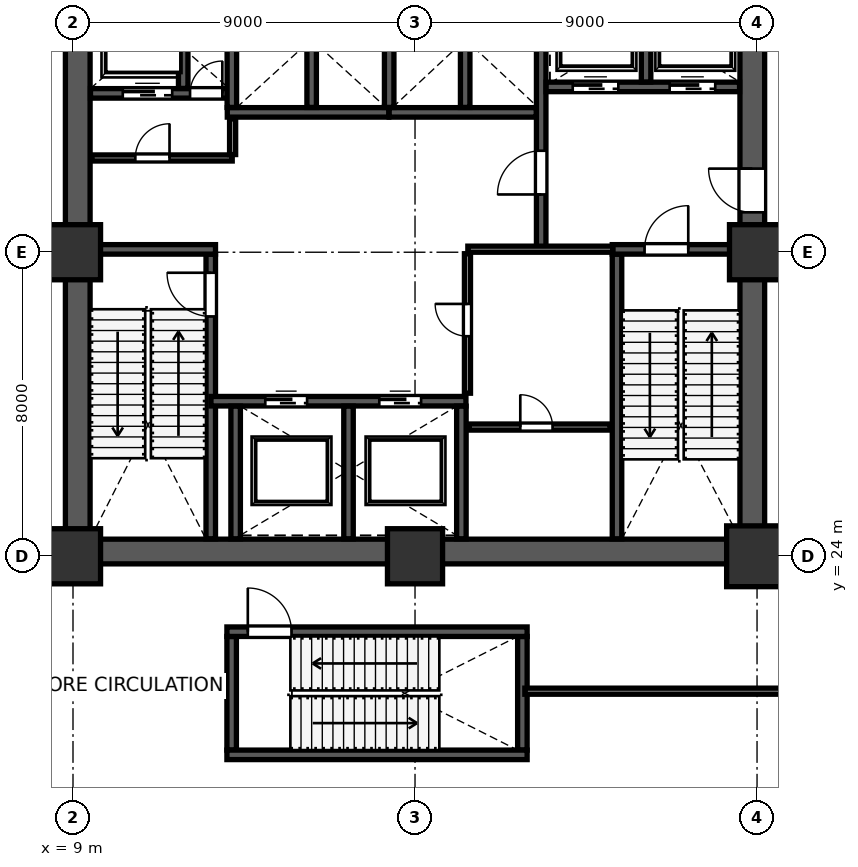
"""IFC4 building model, lengths in metres.
Left out: names, types, materials, properties, quantities, classifications, styles, units other than length and angle.
Written with IfcOpenShell. Run it as: python <this file> out.ifc"""

import sys

from ifc_helpers import new_model, si_unit, direction, frame, frame_2d, origin, origin_2d, place, context, subcontext, project, spatial, rectangle, extrude, source, transform, mapped, element, fill, save


model = new_model("IFC4")
c1 = context("Model", 3, precision=1e-05, world=origin(), true_north=direction((0.0, 1.0)))
c2 = subcontext(c1, "Body", "Model", "MODEL_VIEW")
j1 = project(units=[si_unit("LENGTHUNIT", "METRE"), si_unit("PLANEANGLEUNIT", "RADIAN")], contexts=[c1])
p1 = place(None, origin())
s1 = spatial("IfcSite", under=j1, at=p1, CompositionType="ELEMENT")
p2 = place(p1, origin())
s2 = spatial("IfcBuilding", under=s1, at=p2, CompositionType="ELEMENT")
p3 = place(p2, frame((0.0, 0.0, 12.0)))
s3 = spatial("IfcBuildingStorey", under=s2, at=p3, CompositionType="ELEMENT", Elevation=12.0)
m1 = source(origin(), c2, "Body", "SweptSolid", [
    extrude(rectangle(XDim=1.45, YDim=1.45, at=origin_2d()), origin(), (0.0, 0.0, 1.0), 5.398),
])
p4 = place(p3, frame((9.0, 24.0, 0.001), z_axis=(0.0, 0.0, 1.0), x_axis=(1.0, 0.0, 0.0)))
e1 = element("IfcColumn", 1, at=p4, inside=s3, PredefinedType="COLUMN", context=c2, shape_type="MappedRepresentation", body=[
    mapped(m1, transform((0.0, 0.0, 0.0), scale=1.0)),
])
m2 = source(origin(), c2, "Body", "SweptSolid", [
    extrude(rectangle(XDim=1.45, YDim=1.45, at=origin_2d()), origin(), (0.0, 0.0, 1.0), 5.398),
])
p5 = place(p3, frame((9.0, 32.0, 0.001), z_axis=(0.0, 0.0, 1.0), x_axis=(1.0, 0.0, 0.0)))
e2 = element("IfcColumn", 2, at=p5, inside=s3, PredefinedType="COLUMN", context=c2, shape_type="MappedRepresentation", body=[
    mapped(m2, transform((0.0, 0.0, 0.0), scale=1.0)),
])
p6 = place(p3, frame((18.0, 24.0, 0.001), z_axis=(0.0, 0.0, 1.0), x_axis=(1.0, 0.0, 0.0)))
e3 = element("IfcColumn", 3, at=p6, inside=s3, PredefinedType="COLUMN", context=c2, shape_type="MappedRepresentation", body=[
    mapped(m1, transform((0.0, 0.0, 0.0), scale=1.0)),
])
m3 = source(origin(), c2, "Body", "SweptSolid", [
    extrude(rectangle(XDim=1.6, YDim=1.6, at=origin_2d()), origin(), (0.0, 0.0, 1.0), 5.398),
])
p7 = place(p3, frame((27.0, 24.0, 0.001), z_axis=(0.0, 0.0, 1.0), x_axis=(1.0, 0.0, 0.0)))
e4 = element("IfcColumn", 4, at=p7, inside=s3, PredefinedType="COLUMN", context=c2, shape_type="MappedRepresentation", body=[
    mapped(m3, transform((0.0, 0.0, 0.0), scale=1.0)),
])
p8 = place(p3, frame((27.0, 32.0, 0.001), z_axis=(0.0, 0.0, 1.0), x_axis=(1.0, 0.0, 0.0)))
e5 = element("IfcColumn", 5, at=p8, inside=s3, PredefinedType="COLUMN", context=c2, shape_type="MappedRepresentation", body=[
    mapped(m2, transform((0.0, 0.0, 0.0), scale=1.0)),
])
p9 = place(p3, frame((9.125, 24.45, 0.0), z_axis=(0.0, 0.0, 1.0), x_axis=(0.0, 1.0, 0.0)))
e6 = element("IfcWall", 6, at=p9, inside=s3, PredefinedType="SHEAR", context=c2, shape_type="SweptSolid", body=[
    extrude(rectangle(XDim=15.1, YDim=0.65, at=frame_2d((7.55, 0.0))), origin(), (0.0, 0.0, 1.0), 5.14),
])
p10 = place(p3, frame((26.875, 24.45, 0.0), z_axis=(0.0, 0.0, 1.0), x_axis=(0.0, 1.0, 0.0)))
e7 = element("IfcWall", 7, at=p10, inside=s3, PredefinedType="SHEAR", context=c2, shape_type="SweptSolid", body=[
    extrude(rectangle(XDim=15.1, YDim=0.65, at=frame_2d((7.55, 0.0))), origin(), (0.0, 0.0, 1.0), 5.14),
])
p11 = place(p10, frame((8.6, 0.0, 0.0)))
e8 = element("IfcOpeningElement", 8, at=p11, cuts=e7, PredefinedType="OPENING", context=c2, shape_type="SweptSolid", body=[
    extrude(rectangle(XDim=1.15, YDim=2.2, at=frame_2d((0.575, 1.1))), frame((0.0, 0.335, 0.0), z_axis=(0.0, -1.0, 0.0), x_axis=(1.0, 0.0, 0.0)), (0.0, 0.0, 1.0), 0.67),
])
p12 = place(p3, frame((8.8, 24.125, 0.0), z_axis=(0.0, 0.0, 1.0), x_axis=(1.0, 0.0, 0.0)))
e9 = element("IfcWall", 9, at=p12, inside=s3, PredefinedType="SHEAR", context=c2, shape_type="SweptSolid", body=[
    extrude(rectangle(XDim=18.4, YDim=0.65, at=frame_2d((9.2, 0.0))), origin(), (0.0, 0.0, 1.0), 5.14),
])
p13 = place(p3, frame((12.625, 24.46, 0.0), z_axis=(0.0, 0.0, 1.0), x_axis=(0.0, 1.0, 0.0)))
e10 = element("IfcWall", 10, at=p13, inside=s3, PredefinedType="SHEAR", context=c2, shape_type="SweptSolid", body=[
    extrude(rectangle(XDim=7.49, YDim=0.25, at=frame_2d((3.745, 0.0))), origin(), (0.0, 0.0, 1.0), 5.14),
])
p14 = place(p13, frame((5.85, 0.0, 0.0)))
e11 = element("IfcOpeningElement", 11, at=p14, cuts=e10, PredefinedType="OPENING", context=c2, shape_type="SweptSolid", body=[
    extrude(rectangle(XDim=1.15, YDim=2.2, at=frame_2d((0.575, 1.1))), frame((0.0, 0.135, 0.0), z_axis=(0.0, -1.0, 0.0), x_axis=(1.0, 0.0, 0.0)), (0.0, 0.0, 1.0), 0.27),
])
p15 = place(p3, frame((9.46, 32.075, 0.0), z_axis=(0.0, 0.0, 1.0), x_axis=(1.0, 0.0, 0.0)))
e12 = element("IfcWall", 12, at=p15, inside=s3, PredefinedType="SHEAR", context=c2, shape_type="SweptSolid", body=[
    extrude(rectangle(XDim=3.29, YDim=0.25, at=frame_2d((1.645, 0.0))), origin(), (0.0, 0.0, 1.0), 5.14),
])
p16 = place(p3, frame((23.315, 24.46, 0.0), z_axis=(0.0, 0.0, 1.0), x_axis=(0.0, 1.0, 0.0)))
e13 = element("IfcWall", 13, at=p16, inside=s3, PredefinedType="SHEAR", context=c2, shape_type="SweptSolid", body=[
    extrude(rectangle(XDim=7.49, YDim=0.25, at=frame_2d((3.745, 0.0))), origin(), (0.0, 0.0, 1.0), 5.14),
])
p17 = place(p3, frame((23.19, 32.075, 0.0), z_axis=(0.0, 0.0, 1.0), x_axis=(1.0, 0.0, 0.0)))
e14 = element("IfcWall", 14, at=p17, inside=s3, PredefinedType="SHEAR", context=c2, shape_type="SweptSolid", body=[
    extrude(rectangle(XDim=3.35, YDim=0.25, at=frame_2d((1.675, 0.0))), origin(), (0.0, 0.0, 1.0), 5.14),
])
p18 = place(p17, frame((0.85, 0.0, 0.0)))
e15 = element("IfcOpeningElement", 15, at=p18, cuts=e14, PredefinedType="OPENING", context=c2, shape_type="SweptSolid", body=[
    extrude(rectangle(XDim=1.15, YDim=2.2, at=frame_2d((0.575, 1.1))), frame((0.0, 0.135, 0.0), z_axis=(0.0, -1.0, 0.0), x_axis=(1.0, 0.0, 0.0)), (0.0, 0.0, 1.0), 0.27),
])
p19 = place(p3, frame((21.32, 32.12, 0.0), z_axis=(0.0, 0.0, 1.0), x_axis=(0.0, 1.0, 0.0)))
e16 = element("IfcWall", 16, at=p19, inside=s3, PredefinedType="SHEAR", context=c2, shape_type="SweptSolid", body=[
    extrude(rectangle(XDim=7.42, YDim=0.25, at=frame_2d((3.71, 0.0))), origin(), (0.0, 0.0, 1.0), 5.14),
])
p20 = place(p19, frame((1.4, 0.0, 0.0)))
e17 = element("IfcOpeningElement", 17, at=p20, cuts=e16, PredefinedType="OPENING", context=c2, shape_type="SweptSolid", body=[
    extrude(rectangle(XDim=1.15, YDim=2.2, at=frame_2d((0.575, 1.1))), frame((0.0, 0.135, 0.0), z_axis=(0.0, -1.0, 0.0), x_axis=(1.0, 0.0, 0.0)), (0.0, 0.0, 1.0), 0.27),
])
p21 = place(p3, frame((9.46, 36.18, 0.0), z_axis=(0.0, 0.0, 1.0), x_axis=(1.0, 0.0, 0.0)))
e18 = element("IfcWall", 18, at=p21, inside=s3, PredefinedType="SHEAR", context=c2, shape_type="SweptSolid", body=[
    extrude(rectangle(XDim=3.79, YDim=0.25, at=frame_2d((1.895, 0.0))), origin(), (0.0, 0.0, 1.0), 5.14),
])
p22 = place(p21, frame((2.62, 0.0, 0.0)))
e19 = element("IfcOpeningElement", 19, at=p22, cuts=e18, PredefinedType="OPENING", context=c2, shape_type="SweptSolid", body=[
    extrude(rectangle(XDim=0.85, YDim=2.1, at=frame_2d((0.425, 1.05))), frame((0.0, 0.135, 0.0), z_axis=(0.0, -1.0, 0.0), x_axis=(1.0, 0.0, 0.0)), (0.0, 0.0, 1.0), 0.27),
])
p23 = place(p21, frame((0.85, 0.0, 0.0)))
e20 = element("IfcOpeningElement", 20, at=p23, cuts=e18, PredefinedType="OPENING", context=c2, shape_type="SweptSolid", body=[
    extrude(rectangle(XDim=1.3, YDim=2.25, at=frame_2d((0.65, 1.125))), frame((0.0, 0.135, 0.0), z_axis=(0.0, -1.0, 0.0), x_axis=(1.0, 0.0, 0.0)), (0.0, 0.0, 1.0), 0.27),
])
p24 = place(p3, frame((11.9, 36.31, 0.0), z_axis=(0.0, 0.0, 1.0), x_axis=(0.0, 1.0, 0.0)))
e21 = element("IfcWall", 21, at=p24, inside=s3, PredefinedType="SHEAR", context=c2, shape_type="SweptSolid", body=[
    extrude(rectangle(XDim=3.23, YDim=0.25, at=frame_2d((1.615, 0.0))), origin(), (0.0, 0.0, 1.0), 5.14),
])
p25 = place(p3, frame((21.45, 36.35, 0.0), z_axis=(0.0, 0.0, 1.0), x_axis=(1.0, 0.0, 0.0)))
e22 = element("IfcWall", 22, at=p25, inside=s3, PredefinedType="SHEAR", context=c2, shape_type="SweptSolid", body=[
    extrude(rectangle(XDim=5.09, YDim=0.25, at=frame_2d((2.545, 0.0))), origin(), (0.0, 0.0, 1.0), 5.14),
])
p26 = place(p25, frame((0.7, 0.0, 0.0)))
e23 = element("IfcOpeningElement", 23, at=p26, cuts=e22, PredefinedType="OPENING", context=c2, shape_type="SweptSolid", body=[
    extrude(rectangle(XDim=1.2, YDim=2.2, at=frame_2d((0.6, 1.1))), frame((0.0, 0.135, 0.0), z_axis=(0.0, -1.0, 0.0), x_axis=(1.0, 0.0, 0.0)), (0.0, 0.0, 1.0), 0.27),
])
p27 = place(p25, frame((3.25, 0.0, 0.0)))
e24 = element("IfcOpeningElement", 24, at=p27, cuts=e22, PredefinedType="OPENING", context=c2, shape_type="SweptSolid", body=[
    extrude(rectangle(XDim=1.2, YDim=2.2, at=frame_2d((0.6, 1.1))), frame((0.0, 0.135, 0.0), z_axis=(0.0, -1.0, 0.0), x_axis=(1.0, 0.0, 0.0)), (0.0, 0.0, 1.0), 0.27),
])
p28 = place(p3, frame((24.08, 36.48, 0.0), z_axis=(0.0, 0.0, 1.0), x_axis=(0.0, 1.0, 0.0)))
e25 = element("IfcWall", 25, at=p28, inside=s3, PredefinedType="SHEAR", context=c2, shape_type="SweptSolid", body=[
    extrude(rectangle(XDim=3.06, YDim=0.25, at=frame_2d((1.53, 0.0))), origin(), (0.0, 0.0, 1.0), 5.14),
])
p29 = place(p3, frame((12.63, 28.08, 0.0), z_axis=(0.0, 0.0, 1.0), x_axis=(1.0, 0.0, 0.0)))
e26 = element("IfcWall", 26, at=p29, inside=s3, PredefinedType="SHEAR", context=c2, shape_type="SweptSolid", body=[
    extrude(rectangle(XDim=6.71, YDim=0.25, at=frame_2d((3.355, 0.0))), origin(), (0.0, 0.0, 1.0), 5.14),
])
p30 = place(p29, frame((1.43, 0.0, 0.0)))
e27 = element("IfcOpeningElement", 27, at=p30, cuts=e26, PredefinedType="OPENING", context=c2, shape_type="SweptSolid", body=[
    extrude(rectangle(XDim=1.1, YDim=2.2, at=frame_2d((0.55, 1.1))), frame((0.0, 0.135, 0.0), z_axis=(0.0, -1.0, 0.0), x_axis=(1.0, 0.0, 0.0)), (0.0, 0.0, 1.0), 0.27),
])
p31 = place(p29, frame((4.43, 0.0, 0.0)))
e28 = element("IfcOpeningElement", 28, at=p31, cuts=e26, PredefinedType="OPENING", context=c2, shape_type="SweptSolid", body=[
    extrude(rectangle(XDim=1.1, YDim=2.2, at=frame_2d((0.55, 1.1))), frame((0.0, 0.135, 0.0), z_axis=(0.0, -1.0, 0.0), x_axis=(1.0, 0.0, 0.0)), (0.0, 0.0, 1.0), 0.27),
])
for number, where, z_axis, x_axis in (
    (29, (13.28, 24.46, 0.0), (0.0, 0.0, 1.0), (0.0, 1.0, 0.0)),
    (30, (16.25, 24.46, 0.0), (0.0, 0.0, 1.0), (0.0, 1.0, 0.0)),
    (31, (19.22, 24.46, 0.0), (0.0, 0.0, 1.0), (0.0, 1.0, 0.0)),
):
    element("IfcWall", number, at=place(p3, frame(where, z_axis=z_axis, x_axis=x_axis)), inside=s3, PredefinedType="SHEAR", context=c2, shape_type="SweptSolid", body=[
        extrude(rectangle(XDim=3.49, YDim=0.25, at=frame_2d((1.745, 0.0))), origin(), (0.0, 0.0, 1.0), 5.14),
    ])
p32 = place(p3, frame((13.06, 35.68, 0.0), z_axis=(0.0, 0.0, 1.0), x_axis=(1.0, 0.0, 0.0)))
e32 = element("IfcWall", 32, at=p32, inside=s3, PredefinedType="SHEAR", context=c2, shape_type="SweptSolid", body=[
    extrude(rectangle(XDim=4.25, YDim=0.25, at=frame_2d((2.125, 0.0))), origin(), (0.0, 0.0, 1.0), 5.14),
])
for number, where, z_axis, x_axis in (
    (33, (13.18, 35.81, 0.0), (0.0, 0.0, 1.0), (0.0, 1.0, 0.0)),
    (34, (15.28, 35.81, 0.0), (0.0, 0.0, 1.0), (0.0, 1.0, 0.0)),
):
    element("IfcWall", number, at=place(p3, frame(where, z_axis=z_axis, x_axis=x_axis)), inside=s3, PredefinedType="SHEAR", context=c2, shape_type="SweptSolid", body=[
        extrude(rectangle(XDim=3.73, YDim=0.25, at=frame_2d((1.865, 0.0))), origin(), (0.0, 0.0, 1.0), 5.14),
    ])
p33 = place(p3, frame((17.32, 35.68, 0.0), z_axis=(0.0, 0.0, 1.0), x_axis=(1.0, 0.0, 0.0)))
e35 = element("IfcWall", 35, at=p33, inside=s3, PredefinedType="SHEAR", context=c2, shape_type="SweptSolid", body=[
    extrude(rectangle(XDim=3.87, YDim=0.25, at=frame_2d((1.935, 0.0))), origin(), (0.0, 0.0, 1.0), 5.14),
])
for number, where, z_axis, x_axis in (
    (36, (17.32, 35.81, 0.0), (0.0, 0.0, 1.0), (0.0, 1.0, 0.0)),
    (37, (19.32, 35.81, 0.0), (0.0, 0.0, 1.0), (0.0, 1.0, 0.0)),
):
    element("IfcWall", number, at=place(p3, frame(where, z_axis=z_axis, x_axis=x_axis)), inside=s3, PredefinedType="SHEAR", context=c2, shape_type="SweptSolid", body=[
        extrude(rectangle(XDim=3.73, YDim=0.25, at=frame_2d((1.865, 0.0))), origin(), (0.0, 0.0, 1.0), 5.14),
    ])
for number, where, z_axis, x_axis in (
    (38, (13.175, 18.9, 0.0), (0.0, 0.0, 1.0), (0.0, 1.0, 0.0)),
    (39, (20.825, 18.9, 0.0), (0.0, 0.0, 1.0), (0.0, 1.0, 0.0)),
):
    element("IfcWall", number, at=place(p3, frame(where, z_axis=z_axis, x_axis=x_axis)), inside=s3, PredefinedType="SHEAR", context=c2, shape_type="SweptSolid", body=[
        extrude(rectangle(XDim=2.99, YDim=0.25, at=frame_2d((1.495, 0.0))), origin(), (0.0, 0.0, 1.0), 5.14),
    ])
p34 = place(p3, frame((13.05, 18.775, 0.0), z_axis=(0.0, 0.0, 1.0), x_axis=(1.0, 0.0, 0.0)))
e40 = element("IfcWall", 40, at=p34, inside=s3, PredefinedType="SHEAR", context=c2, shape_type="SweptSolid", body=[
    extrude(rectangle(XDim=7.9, YDim=0.25, at=frame_2d((3.95, 0.0))), origin(), (0.0, 0.0, 1.0), 5.14),
])
p35 = place(p3, frame((13.05, 22.015, 0.0), z_axis=(0.0, 0.0, 1.0), x_axis=(1.0, 0.0, 0.0)))
e41 = element("IfcWall", 41, at=p35, inside=s3, PredefinedType="SHEAR", context=c2, shape_type="SweptSolid", body=[
    extrude(rectangle(XDim=7.9, YDim=0.25, at=frame_2d((3.95, 0.0))), origin(), (0.0, 0.0, 1.0), 5.14),
])
p36 = place(p35, frame((0.55, 0.0, 0.0)))
e42 = element("IfcOpeningElement", 42, at=p36, cuts=e41, PredefinedType="OPENING", context=c2, shape_type="SweptSolid", body=[
    extrude(rectangle(XDim=1.15, YDim=2.2, at=frame_2d((0.575, 1.1))), frame((0.0, 0.135, 0.0), z_axis=(0.0, -1.0, 0.0), x_axis=(1.0, 0.0, 0.0)), (0.0, 0.0, 1.0), 0.27),
])
p37 = place(p3, frame((9.49, 34.48, 0.0), z_axis=(0.0, 0.0, 1.0), x_axis=(1.0, 0.0, 0.0)))
e43 = element("IfcWall", 43, at=p37, inside=s3, PredefinedType="PARTITIONING", context=c2, shape_type="SweptSolid", body=[
    extrude(rectangle(XDim=3.7, YDim=0.16, at=frame_2d((1.85, 0.0))), origin(), (0.0, 0.0, 1.0), 5.14),
])
p38 = place(p37, frame((1.15, 0.0, 0.0)))
e44 = element("IfcOpeningElement", 44, at=p38, cuts=e43, PredefinedType="OPENING", context=c2, shape_type="SweptSolid", body=[
    extrude(rectangle(XDim=0.9, YDim=2.15, at=frame_2d((0.45, 1.075))), frame((0.0, 0.09, 0.0), z_axis=(0.0, -1.0, 0.0), x_axis=(1.0, 0.0, 0.0)), (0.0, 0.0, 1.0), 0.18),
])
p39 = place(p3, frame((13.2, 34.57, 0.0), z_axis=(0.0, 0.0, 1.0), x_axis=(0.0, 1.0, 0.0)))
e45 = element("IfcWall", 45, at=p39, inside=s3, PredefinedType="PARTITIONING", context=c2, shape_type="SweptSolid", body=[
    extrude(rectangle(XDim=0.94, YDim=0.16, at=frame_2d((0.47, 0.0))), origin(), (0.0, 0.0, 1.0), 5.14),
])
p40 = place(p3, frame((19.39, 32.08, 0.0), z_axis=(0.0, 0.0, 1.0), x_axis=(1.0, 0.0, 0.0)))
e46 = element("IfcWall", 46, at=p40, inside=s3, PredefinedType="PARTITIONING", context=c2, shape_type="SweptSolid", body=[
    extrude(rectangle(XDim=3.82, YDim=0.16, at=frame_2d((1.91, 0.0))), origin(), (0.0, 0.0, 1.0), 5.14),
])
p41 = place(p3, frame((19.38, 28.29, 0.0), z_axis=(0.0, 0.0, 1.0), x_axis=(0.0, 1.0, 0.0)))
e47 = element("IfcWall", 47, at=p41, inside=s3, PredefinedType="PARTITIONING", context=c2, shape_type="SweptSolid", body=[
    extrude(rectangle(XDim=3.67, YDim=0.16, at=frame_2d((1.835, 0.0))), origin(), (0.0, 0.0, 1.0), 5.14),
])
p42 = place(p41, frame((1.5, 0.0, 0.0)))
e48 = element("IfcOpeningElement", 48, at=p42, cuts=e47, PredefinedType="OPENING", context=c2, shape_type="SweptSolid", body=[
    extrude(rectangle(XDim=0.85, YDim=2.1, at=frame_2d((0.425, 1.05))), frame((0.0, 0.09, 0.0), z_axis=(0.0, -1.0, 0.0), x_axis=(1.0, 0.0, 0.0)), (0.0, 0.0, 1.0), 0.18),
])
p43 = place(p3, frame((19.42, 27.4, 0.0), z_axis=(0.0, 0.0, 1.0), x_axis=(1.0, 0.0, 0.0)))
e49 = element("IfcWall", 49, at=p43, inside=s3, PredefinedType="PARTITIONING", context=c2, shape_type="SweptSolid", body=[
    extrude(rectangle(XDim=3.72, YDim=0.16, at=frame_2d((1.86, 0.0))), origin(), (0.0, 0.0, 1.0), 5.14),
])
p44 = place(p43, frame((1.35, 0.0, 0.0)))
e50 = element("IfcOpeningElement", 50, at=p44, cuts=e49, PredefinedType="OPENING", context=c2, shape_type="SweptSolid", body=[
    extrude(rectangle(XDim=0.85, YDim=2.1, at=frame_2d((0.425, 1.05))), frame((0.0, 0.09, 0.0), z_axis=(0.0, -1.0, 0.0), x_axis=(1.0, 0.0, 0.0)), (0.0, 0.0, 1.0), 0.18),
])
p45 = place(p3, frame((20.89, 20.45, 0.0), z_axis=(0.0, 0.0, 1.0), x_axis=(1.0, 0.0, 0.0)))
e51 = element("IfcWall", 51, at=p45, inside=s3, PredefinedType="PARTITIONING", context=c2, shape_type="SweptSolid", body=[
    extrude(rectangle(XDim=27.07, YDim=0.16, at=frame_2d((13.535, 0.0))), origin(), (0.0, 0.0, 1.0), 4.27),
])
p46 = place(p45, frame((10.6, 0.0, 0.0)))
e52 = element("IfcOpeningElement", 52, at=p46, cuts=e51, PredefinedType="OPENING", context=c2, shape_type="SweptSolid", body=[
    extrude(rectangle(XDim=1.1, YDim=2.2, at=frame_2d((0.55, 1.1))), frame((0.0, 0.09, 0.0), z_axis=(0.0, -1.0, 0.0), x_axis=(1.0, 0.0, 0.0)), (0.0, 0.0, 1.0), 0.18),
])
m4 = source(origin(), c2, "Body", "SweptSolid", [
    extrude(rectangle(XDim=1.15, YDim=2.2, at=frame_2d((0.575, 1.1))), frame((0.0, 0.025, 0.0), z_axis=(0.0, -1.0, 0.0), x_axis=(1.0, 0.0, 0.0)), (0.0, 0.0, 1.0), 0.05),
])
p47 = place(p14, origin())
e53 = element("IfcDoor", 53, at=p47, inside=s3, OperationType="SINGLE_SWING_RIGHT", PredefinedType="DOOR", context=c2, shape_type="MappedRepresentation", body=[
    mapped(m4, transform((0.0, 0.0, 0.0), scale=1.0)),
])
fill(e11, e53)
m5 = source(origin(), c2, "Body", "SweptSolid", [
    extrude(rectangle(XDim=1.15, YDim=2.2, at=frame_2d((0.575, 1.1))), frame((0.0, 0.025, 0.0), z_axis=(0.0, -1.0, 0.0), x_axis=(1.0, 0.0, 0.0)), (0.0, 0.0, 1.0), 0.05),
])
p48 = place(p20, origin())
e54 = element("IfcDoor", 54, at=p48, inside=s3, OperationType="SINGLE_SWING_LEFT", PredefinedType="DOOR", context=c2, shape_type="MappedRepresentation", body=[
    mapped(m5, transform((0.0, 0.0, 0.0), scale=1.0)),
])
fill(e17, e54)
p49 = place(p18, origin())
e55 = element("IfcDoor", 55, at=p49, inside=s3, OperationType="SINGLE_SWING_RIGHT", PredefinedType="DOOR", context=c2, shape_type="MappedRepresentation", body=[
    mapped(m4, transform((0.0, 0.0, 0.0), scale=1.0)),
])
fill(e15, e55)
p50 = place(p11, origin())
e56 = element("IfcDoor", 56, at=p50, inside=s3, OperationType="SINGLE_SWING_RIGHT", PredefinedType="DOOR", context=c2, shape_type="MappedRepresentation", body=[
    mapped(m5, transform((0.0, 0.0, 0.0), scale=1.0)),
])
fill(e8, e56)
p51 = place(p36, origin())
e57 = element("IfcDoor", 57, at=p51, inside=s3, OperationType="SINGLE_SWING_LEFT", PredefinedType="DOOR", context=c2, shape_type="MappedRepresentation", body=[
    mapped(m4, transform((0.0, 0.0, 0.0), scale=1.0)),
])
fill(e42, e57)
m6 = source(origin(), c2, "Body", "SweptSolid", [
    extrude(rectangle(XDim=0.85, YDim=2.1, at=frame_2d((0.425, 1.05))), frame((0.0, 0.025, 0.0), z_axis=(0.0, -1.0, 0.0), x_axis=(1.0, 0.0, 0.0)), (0.0, 0.0, 1.0), 0.05),
])
p52 = place(p22, origin())
e58 = element("IfcDoor", 58, at=p52, inside=s3, OperationType="SINGLE_SWING_RIGHT", PredefinedType="DOOR", context=c2, shape_type="MappedRepresentation", body=[
    mapped(m6, transform((0.0, 0.0, 0.0), scale=1.0)),
])
fill(e19, e58)
m7 = source(origin(), c2, "Body", "SweptSolid", [
    extrude(rectangle(XDim=1.1, YDim=2.2, at=frame_2d((0.55, 1.1))), frame((0.0, 0.025, 0.0), z_axis=(0.0, -1.0, 0.0), x_axis=(1.0, 0.0, 0.0)), (0.0, 0.0, 1.0), 0.05),
])
p53 = place(p30, origin())
e59 = element("IfcDoor", 59, at=p53, inside=s3, OperationType="SLIDING_TO_LEFT", PredefinedType="DOOR", context=c2, shape_type="MappedRepresentation", body=[
    mapped(m7, transform((0.0, 0.0, 0.0), scale=1.0)),
])
fill(e27, e59)
p54 = place(p31, origin())
e60 = element("IfcDoor", 60, at=p54, inside=s3, OperationType="SLIDING_TO_RIGHT", PredefinedType="DOOR", context=c2, shape_type="MappedRepresentation", body=[
    mapped(m7, transform((0.0, 0.0, 0.0), scale=1.0)),
])
fill(e28, e60)
m8 = source(origin(), c2, "Body", "SweptSolid", [
    extrude(rectangle(XDim=1.2, YDim=2.2, at=frame_2d((0.6, 1.1))), frame((0.0, 0.025, 0.0), z_axis=(0.0, -1.0, 0.0), x_axis=(1.0, 0.0, 0.0)), (0.0, 0.0, 1.0), 0.05),
])
p55 = place(p26, origin())
e61 = element("IfcDoor", 61, at=p55, inside=s3, OperationType="SLIDING_TO_LEFT", PredefinedType="DOOR", context=c2, shape_type="MappedRepresentation", body=[
    mapped(m8, transform((0.0, 0.0, 0.0), scale=1.0)),
])
fill(e23, e61)
p56 = place(p27, origin())
e62 = element("IfcDoor", 62, at=p56, inside=s3, OperationType="SLIDING_TO_RIGHT", PredefinedType="DOOR", context=c2, shape_type="MappedRepresentation", body=[
    mapped(m8, transform((0.0, 0.0, 0.0), scale=1.0)),
])
fill(e24, e62)
m9 = source(origin(), c2, "Body", "SweptSolid", [
    extrude(rectangle(XDim=1.3, YDim=2.25, at=frame_2d((0.65, 1.125))), frame((0.0, 0.025, 0.0), z_axis=(0.0, -1.0, 0.0), x_axis=(1.0, 0.0, 0.0)), (0.0, 0.0, 1.0), 0.05),
])
p57 = place(p23, origin())
e63 = element("IfcDoor", 63, at=p57, inside=s3, OperationType="SLIDING_TO_LEFT", PredefinedType="DOOR", context=c2, shape_type="MappedRepresentation", body=[
    mapped(m9, transform((0.0, 0.0, 0.0), scale=1.0)),
])
fill(e20, e63)
m10 = source(origin(), c2, "Body", "SweptSolid", [
    extrude(rectangle(XDim=0.9, YDim=2.15, at=frame_2d((0.45, 1.075))), frame((0.0, 0.025, 0.0), z_axis=(0.0, -1.0, 0.0), x_axis=(1.0, 0.0, 0.0)), (0.0, 0.0, 1.0), 0.05),
])
p58 = place(p38, origin())
e64 = element("IfcDoor", 64, at=p58, inside=s3, OperationType="SINGLE_SWING_RIGHT", PredefinedType="DOOR", context=c2, shape_type="MappedRepresentation", body=[
    mapped(m10, transform((0.0, 0.0, 0.0), scale=1.0)),
])
fill(e44, e64)
p59 = place(p44, origin())
e65 = element("IfcDoor", 65, at=p59, inside=s3, OperationType="SINGLE_SWING_LEFT", PredefinedType="DOOR", context=c2, shape_type="MappedRepresentation", body=[
    mapped(m6, transform((0.0, 0.0, 0.0), scale=1.0)),
])
fill(e50, e65)
p60 = place(p42, origin())
e66 = element("IfcDoor", 66, at=p60, inside=s3, OperationType="SINGLE_SWING_RIGHT", PredefinedType="DOOR", context=c2, shape_type="MappedRepresentation", body=[
    mapped(m6, transform((0.0, 0.0, 0.0), scale=1.0)),
])
fill(e48, e66)
save(model, sys.argv[1])
